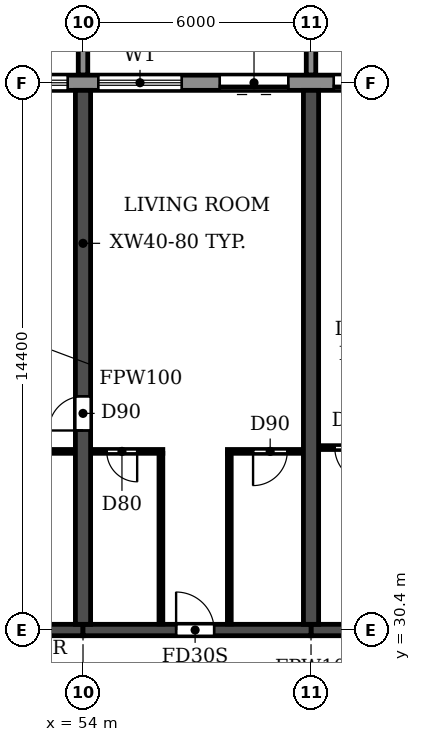
"""IFC4 building model, lengths in metres.
Left out: names, types, materials, properties, quantities, classifications, styles, units other than length and angle.
Written with IfcOpenShell. Run it as: python <this file> out.ifc"""

import sys

from ifc_helpers import new_model, si_unit, direction, frame, frame_2d, origin, place, context, subcontext, project, spatial, polyline, rectangle, outline, extrude, source, transform, mapped, element, fill, save


model = new_model("IFC4")
c1 = context("Model", 3, precision=1e-05, world=origin(), true_north=direction((0.0, 1.0)))
c2 = subcontext(c1, "Body", "Model", "MODEL_VIEW")
j1 = project(units=[si_unit("LENGTHUNIT", "METRE"), si_unit("PLANEANGLEUNIT", "RADIAN")], contexts=[c1])
p1 = place(None, origin())
s1 = spatial("IfcSite", under=j1, at=p1, CompositionType="ELEMENT")
p2 = place(p1, origin())
s2 = spatial("IfcBuilding", under=s1, at=p2, CompositionType="ELEMENT")
p3 = place(p2, frame((0.0, 0.0, 56.4)))
s3 = spatial("IfcBuildingStorey", under=s2, at=p3, CompositionType="ELEMENT", Elevation=56.4)
p4 = place(p3, frame((54.0, 30.55, 0.0), z_axis=(0.0, 0.0, 1.0), x_axis=(0.0, 1.0, 0.0)))
e1 = element("IfcWall", 1, at=p4, inside=s3, PredefinedType="SHEAR", context=c2, shape_type="SweptSolid", body=[
    extrude(rectangle(XDim=14.05, YDim=0.4, at=frame_2d((7.025, 0.0))), origin(), (0.0, 0.0, 1.0), 3.05),
])
p5 = place(p4, frame((5.1, 0.0, 0.0)))
e2 = element("IfcOpeningElement", 2, at=p5, cuts=e1, PredefinedType="OPENING", context=c2, shape_type="SweptSolid", body=[
    extrude(rectangle(XDim=0.9, YDim=2.1, at=frame_2d((0.45, 1.05))), frame((0.0, 0.21, 0.0), z_axis=(0.0, -1.0, 0.0), x_axis=(1.0, 0.0, 0.0)), (0.0, 0.0, 1.0), 0.42),
])
p6 = place(p3, frame((60.0, 30.55, 0.0), z_axis=(0.0, 0.0, 1.0), x_axis=(0.0, 1.0, 0.0)))
e3 = element("IfcWall", 3, at=p6, inside=s3, PredefinedType="SHEAR", context=c2, shape_type="SweptSolid", body=[
    extrude(rectangle(XDim=14.05, YDim=0.4, at=frame_2d((7.025, 0.0))), origin(), (0.0, 0.0, 1.0), 3.05),
])
p7 = place(p3, frame((48.0, 30.4, 0.0), z_axis=(0.0, 0.0, 1.0), x_axis=(1.0, 0.0, 0.0)))
e4 = element("IfcWall", 4, at=p7, inside=s3, PredefinedType="SHEAR", context=c2, shape_type="SweptSolid", body=[
    extrude(rectangle(XDim=6.0, YDim=0.3, at=frame_2d((3.0, 0.0))), origin(), (0.0, 0.0, 1.0), 2.45),
])
p8 = place(p3, frame((54.0, 30.4, 0.0), z_axis=(0.0, 0.0, 1.0), x_axis=(1.0, 0.0, 0.0)))
e5 = element("IfcWall", 5, at=p8, inside=s3, PredefinedType="SHEAR", context=c2, shape_type="SweptSolid", body=[
    extrude(rectangle(XDim=6.0, YDim=0.3, at=frame_2d((3.0, 0.0))), origin(), (0.0, 0.0, 1.0), 2.45),
])
p9 = place(p8, frame((2.45, 0.0, 0.0)))
e6 = element("IfcOpeningElement", 6, at=p9, cuts=e5, PredefinedType="OPENING", context=c2, shape_type="SweptSolid", body=[
    extrude(rectangle(XDim=1.0, YDim=2.1, at=frame_2d((0.5, 1.05))), frame((0.0, 0.16, 0.0), z_axis=(0.0, -1.0, 0.0), x_axis=(1.0, 0.0, 0.0)), (0.0, 0.0, 1.0), 0.32),
])
p10 = place(p3, frame((60.0, 30.4, 0.0), z_axis=(0.0, 0.0, 1.0), x_axis=(1.0, 0.0, 0.0)))
e7 = element("IfcWall", 7, at=p10, inside=s3, PredefinedType="SHEAR", context=c2, shape_type="SweptSolid", body=[
    extrude(rectangle(XDim=6.0, YDim=0.3, at=frame_2d((3.0, 0.0))), origin(), (0.0, 0.0, 1.0), 2.45),
])
p11 = place(p10, frame((2.55, 0.0, 0.0)))
e8 = element("IfcOpeningElement", 8, at=p11, cuts=e7, PredefinedType="OPENING", context=c2, shape_type="SweptSolid", body=[
    extrude(rectangle(XDim=1.0, YDim=2.1, at=frame_2d((0.5, 1.05))), frame((0.0, 0.16, 0.0), z_axis=(0.0, -1.0, 0.0), x_axis=(1.0, 0.0, 0.0)), (0.0, 0.0, 1.0), 0.32),
])
p12 = place(p3, frame((91.317, 44.8, 0.0), z_axis=(0.0, 0.0, 1.0), x_axis=(-1.0, 0.0, 0.0)))
e9 = element("IfcWall", 9, at=p12, inside=s3, PredefinedType="STANDARD", context=c2, shape_type="SweptSolid", body=[
    extrude(rectangle(XDim=80.634, YDim=0.4, at=frame_2d((40.317, 0.0))), origin(), (0.0, 0.0, 1.0), 3.05),
])
p13 = place(p12, frame((76.717, 0.0, 0.9)))
e10 = element("IfcOpeningElement", 10, at=p13, cuts=e9, PredefinedType="OPENING", context=c2, shape_type="SweptSolid", body=[
    extrude(rectangle(XDim=2.2, YDim=1.5, at=frame_2d((1.1, 0.75))), frame((0.0, 0.21, 0.0), z_axis=(0.0, -1.0, 0.0), x_axis=(1.0, 0.0, 0.0)), (0.0, 0.0, 1.0), 0.42),
])
p14 = place(p12, frame((73.917, 0.0, 0.0)))
e11 = element("IfcOpeningElement", 11, at=p14, cuts=e9, PredefinedType="OPENING", context=c2, shape_type="SweptSolid", body=[
    extrude(rectangle(XDim=1.8, YDim=2.4, at=frame_2d((0.9, 1.2))), frame((0.0, 0.21, 0.0), z_axis=(0.0, -1.0, 0.0), x_axis=(1.0, 0.0, 0.0)), (0.0, 0.0, 1.0), 0.42),
])
p15 = place(p12, frame((70.717, 0.0, 0.9)))
e12 = element("IfcOpeningElement", 12, at=p15, cuts=e9, PredefinedType="OPENING", context=c2, shape_type="SweptSolid", body=[
    extrude(rectangle(XDim=2.2, YDim=1.5, at=frame_2d((1.1, 0.75))), frame((0.0, 0.21, 0.0), z_axis=(0.0, -1.0, 0.0), x_axis=(1.0, 0.0, 0.0)), (0.0, 0.0, 1.0), 0.42),
])
p16 = place(p12, frame((67.917, 0.0, 0.0)))
e13 = element("IfcOpeningElement", 13, at=p16, cuts=e9, PredefinedType="OPENING", context=c2, shape_type="SweptSolid", body=[
    extrude(rectangle(XDim=1.8, YDim=2.4, at=frame_2d((0.9, 1.2))), frame((0.0, 0.21, 0.0), z_axis=(0.0, -1.0, 0.0), x_axis=(1.0, 0.0, 0.0)), (0.0, 0.0, 1.0), 0.42),
])
p17 = place(p12, frame((64.717, 0.0, 0.9)))
e14 = element("IfcOpeningElement", 14, at=p17, cuts=e9, PredefinedType="OPENING", context=c2, shape_type="SweptSolid", body=[
    extrude(rectangle(XDim=2.2, YDim=1.5, at=frame_2d((1.1, 0.75))), frame((0.0, 0.21, 0.0), z_axis=(0.0, -1.0, 0.0), x_axis=(1.0, 0.0, 0.0)), (0.0, 0.0, 1.0), 0.42),
])
p18 = place(p12, frame((61.917, 0.0, 0.0)))
e15 = element("IfcOpeningElement", 15, at=p18, cuts=e9, PredefinedType="OPENING", context=c2, shape_type="SweptSolid", body=[
    extrude(rectangle(XDim=1.8, YDim=2.4, at=frame_2d((0.9, 1.2))), frame((0.0, 0.21, 0.0), z_axis=(0.0, -1.0, 0.0), x_axis=(1.0, 0.0, 0.0)), (0.0, 0.0, 1.0), 0.42),
])
p19 = place(p12, frame((58.717, 0.0, 0.9)))
e16 = element("IfcOpeningElement", 16, at=p19, cuts=e9, PredefinedType="OPENING", context=c2, shape_type="SweptSolid", body=[
    extrude(rectangle(XDim=2.2, YDim=1.5, at=frame_2d((1.1, 0.75))), frame((0.0, 0.21, 0.0), z_axis=(0.0, -1.0, 0.0), x_axis=(1.0, 0.0, 0.0)), (0.0, 0.0, 1.0), 0.42),
])
p20 = place(p12, frame((55.717, 0.0, 0.9)))
e17 = element("IfcOpeningElement", 17, at=p20, cuts=e9, PredefinedType="OPENING", context=c2, shape_type="SweptSolid", body=[
    extrude(rectangle(XDim=2.2, YDim=1.5, at=frame_2d((1.1, 0.75))), frame((0.0, 0.21, 0.0), z_axis=(0.0, -1.0, 0.0), x_axis=(1.0, 0.0, 0.0)), (0.0, 0.0, 1.0), 0.42),
])
p21 = place(p12, frame((52.917, 0.0, 0.0)))
e18 = element("IfcOpeningElement", 18, at=p21, cuts=e9, PredefinedType="OPENING", context=c2, shape_type="SweptSolid", body=[
    extrude(rectangle(XDim=1.8, YDim=2.4, at=frame_2d((0.9, 1.2))), frame((0.0, 0.21, 0.0), z_axis=(0.0, -1.0, 0.0), x_axis=(1.0, 0.0, 0.0)), (0.0, 0.0, 1.0), 0.42),
])
p22 = place(p12, frame((49.717, 0.0, 0.9)))
e19 = element("IfcOpeningElement", 19, at=p22, cuts=e9, PredefinedType="OPENING", context=c2, shape_type="SweptSolid", body=[
    extrude(rectangle(XDim=2.2, YDim=1.5, at=frame_2d((1.1, 0.75))), frame((0.0, 0.21, 0.0), z_axis=(0.0, -1.0, 0.0), x_axis=(1.0, 0.0, 0.0)), (0.0, 0.0, 1.0), 0.42),
])
p23 = place(p12, frame((46.917, 0.0, 0.0)))
e20 = element("IfcOpeningElement", 20, at=p23, cuts=e9, PredefinedType="OPENING", context=c2, shape_type="SweptSolid", body=[
    extrude(rectangle(XDim=1.8, YDim=2.4, at=frame_2d((0.9, 1.2))), frame((0.0, 0.21, 0.0), z_axis=(0.0, -1.0, 0.0), x_axis=(1.0, 0.0, 0.0)), (0.0, 0.0, 1.0), 0.42),
])
p24 = place(p12, frame((43.717, 0.0, 0.9)))
e21 = element("IfcOpeningElement", 21, at=p24, cuts=e9, PredefinedType="OPENING", context=c2, shape_type="SweptSolid", body=[
    extrude(rectangle(XDim=2.2, YDim=1.5, at=frame_2d((1.1, 0.75))), frame((0.0, 0.21, 0.0), z_axis=(0.0, -1.0, 0.0), x_axis=(1.0, 0.0, 0.0)), (0.0, 0.0, 1.0), 0.42),
])
p25 = place(p12, frame((40.717, 0.0, 0.9)))
e22 = element("IfcOpeningElement", 22, at=p25, cuts=e9, PredefinedType="OPENING", context=c2, shape_type="SweptSolid", body=[
    extrude(rectangle(XDim=2.2, YDim=1.5, at=frame_2d((1.1, 0.75))), frame((0.0, 0.21, 0.0), z_axis=(0.0, -1.0, 0.0), x_axis=(1.0, 0.0, 0.0)), (0.0, 0.0, 1.0), 0.42),
])
p26 = place(p12, frame((37.717, 0.0, 0.9)))
e23 = element("IfcOpeningElement", 23, at=p26, cuts=e9, PredefinedType="OPENING", context=c2, shape_type="SweptSolid", body=[
    extrude(rectangle(XDim=2.2, YDim=1.5, at=frame_2d((1.1, 0.75))), frame((0.0, 0.21, 0.0), z_axis=(0.0, -1.0, 0.0), x_axis=(1.0, 0.0, 0.0)), (0.0, 0.0, 1.0), 0.42),
])
p27 = place(p12, frame((34.717, 0.0, 0.9)))
e24 = element("IfcOpeningElement", 24, at=p27, cuts=e9, PredefinedType="OPENING", context=c2, shape_type="SweptSolid", body=[
    extrude(rectangle(XDim=2.2, YDim=1.5, at=frame_2d((1.1, 0.75))), frame((0.0, 0.21, 0.0), z_axis=(0.0, -1.0, 0.0), x_axis=(1.0, 0.0, 0.0)), (0.0, 0.0, 1.0), 0.42),
])
p28 = place(p12, frame((31.917, 0.0, 0.0)))
e25 = element("IfcOpeningElement", 25, at=p28, cuts=e9, PredefinedType="OPENING", context=c2, shape_type="SweptSolid", body=[
    extrude(rectangle(XDim=1.8, YDim=2.4, at=frame_2d((0.9, 1.2))), frame((0.0, 0.21, 0.0), z_axis=(0.0, -1.0, 0.0), x_axis=(1.0, 0.0, 0.0)), (0.0, 0.0, 1.0), 0.42),
])
p29 = place(p12, frame((28.917, 0.0, 0.0)))
e26 = element("IfcOpeningElement", 26, at=p29, cuts=e9, PredefinedType="OPENING", context=c2, shape_type="SweptSolid", body=[
    extrude(rectangle(XDim=1.8, YDim=2.4, at=frame_2d((0.9, 1.2))), frame((0.0, 0.21, 0.0), z_axis=(0.0, -1.0, 0.0), x_axis=(1.0, 0.0, 0.0)), (0.0, 0.0, 1.0), 0.42),
])
p30 = place(p12, frame((25.717, 0.0, 0.9)))
e27 = element("IfcOpeningElement", 27, at=p30, cuts=e9, PredefinedType="OPENING", context=c2, shape_type="SweptSolid", body=[
    extrude(rectangle(XDim=2.2, YDim=1.5, at=frame_2d((1.1, 0.75))), frame((0.0, 0.21, 0.0), z_axis=(0.0, -1.0, 0.0), x_axis=(1.0, 0.0, 0.0)), (0.0, 0.0, 1.0), 0.42),
])
p31 = place(p12, frame((22.917, 0.0, 0.0)))
e28 = element("IfcOpeningElement", 28, at=p31, cuts=e9, PredefinedType="OPENING", context=c2, shape_type="SweptSolid", body=[
    extrude(rectangle(XDim=1.8, YDim=2.4, at=frame_2d((0.9, 1.2))), frame((0.0, 0.21, 0.0), z_axis=(0.0, -1.0, 0.0), x_axis=(1.0, 0.0, 0.0)), (0.0, 0.0, 1.0), 0.42),
])
p32 = place(p12, frame((19.717, 0.0, 0.9)))
e29 = element("IfcOpeningElement", 29, at=p32, cuts=e9, PredefinedType="OPENING", context=c2, shape_type="SweptSolid", body=[
    extrude(rectangle(XDim=2.2, YDim=1.5, at=frame_2d((1.1, 0.75))), frame((0.0, 0.21, 0.0), z_axis=(0.0, -1.0, 0.0), x_axis=(1.0, 0.0, 0.0)), (0.0, 0.0, 1.0), 0.42),
])
p33 = place(p12, frame((16.917, 0.0, 0.0)))
e30 = element("IfcOpeningElement", 30, at=p33, cuts=e9, PredefinedType="OPENING", context=c2, shape_type="SweptSolid", body=[
    extrude(rectangle(XDim=1.8, YDim=2.4, at=frame_2d((0.9, 1.2))), frame((0.0, 0.21, 0.0), z_axis=(0.0, -1.0, 0.0), x_axis=(1.0, 0.0, 0.0)), (0.0, 0.0, 1.0), 0.42),
])
p34 = place(p12, frame((13.717, 0.0, 0.9)))
e31 = element("IfcOpeningElement", 31, at=p34, cuts=e9, PredefinedType="OPENING", context=c2, shape_type="SweptSolid", body=[
    extrude(rectangle(XDim=2.2, YDim=1.5, at=frame_2d((1.1, 0.75))), frame((0.0, 0.21, 0.0), z_axis=(0.0, -1.0, 0.0), x_axis=(1.0, 0.0, 0.0)), (0.0, 0.0, 1.0), 0.42),
])
p35 = place(p12, frame((10.917, 0.0, 0.0)))
e32 = element("IfcOpeningElement", 32, at=p35, cuts=e9, PredefinedType="OPENING", context=c2, shape_type="SweptSolid", body=[
    extrude(rectangle(XDim=1.8, YDim=2.4, at=frame_2d((0.9, 1.2))), frame((0.0, 0.21, 0.0), z_axis=(0.0, -1.0, 0.0), x_axis=(1.0, 0.0, 0.0)), (0.0, 0.0, 1.0), 0.42),
])
p36 = place(p12, frame((7.717, 0.0, 0.9)))
e33 = element("IfcOpeningElement", 33, at=p36, cuts=e9, PredefinedType="OPENING", context=c2, shape_type="SweptSolid", body=[
    extrude(rectangle(XDim=2.2, YDim=1.5, at=frame_2d((1.1, 0.75))), frame((0.0, 0.21, 0.0), z_axis=(0.0, -1.0, 0.0), x_axis=(1.0, 0.0, 0.0)), (0.0, 0.0, 1.0), 0.42),
])
p37 = place(p12, frame((4.717, 0.0, 0.9)))
e34 = element("IfcOpeningElement", 34, at=p37, cuts=e9, PredefinedType="OPENING", context=c2, shape_type="SweptSolid", body=[
    extrude(rectangle(XDim=2.2, YDim=1.5, at=frame_2d((1.1, 0.75))), frame((0.0, 0.21, 0.0), z_axis=(0.0, -1.0, 0.0), x_axis=(1.0, 0.0, 0.0)), (0.0, 0.0, 1.0), 0.42),
])
p38 = place(p12, frame((1.717, 0.0, 0.9)))
e35 = element("IfcOpeningElement", 35, at=p38, cuts=e9, PredefinedType="OPENING", context=c2, shape_type="SweptSolid", body=[
    extrude(rectangle(XDim=2.2, YDim=1.5, at=frame_2d((1.1, 0.75))), frame((0.0, 0.21, 0.0), z_axis=(0.0, -1.0, 0.0), x_axis=(1.0, 0.0, 0.0)), (0.0, 0.0, 1.0), 0.42),
])
m1 = source(origin(), c2, "Body", "SweptSolid", [
    extrude(outline(polyline([(0.0, 0.0), (0.25, 0.0), (0.25, 3.1), (0.0, 3.1), (0.0, 0.0)])), origin(), (0.0, 0.0, 1.0), 3.1),
])
for number, where in (
    (36, (53.875, 45.0, 0.0)),
    (37, (59.875, 45.0, 0.0)),
):
    element("IfcWall", number, at=place(p3, frame(where)), inside=s3, PredefinedType="STANDARD", context=c2, shape_type="MappedRepresentation", body=[
        mapped(m1, transform((0.0, 0.0, 0.0))),
    ])
p39 = place(p3, frame((51.1, 35.1, 0.0), z_axis=(0.0, 0.0, 1.0), x_axis=(1.0, 0.0, 0.0)))
e38 = element("IfcWall", 38, at=p39, inside=s3, PredefinedType="PARTITIONING", context=c2, shape_type="SweptSolid", body=[
    extrude(rectangle(XDim=2.69, YDim=0.1, at=frame_2d((1.345, 0.0))), origin(), (0.0, 0.0, 1.0), 3.05),
])
p40 = place(p39, frame((1.0, 0.0, 0.0)))
e39 = element("IfcOpeningElement", 39, at=p40, cuts=e38, PredefinedType="OPENING", context=c2, shape_type="SweptSolid", body=[
    extrude(rectangle(XDim=0.8, YDim=2.1, at=frame_2d((0.4, 1.05))), frame((0.0, 0.06, 0.0), z_axis=(0.0, -1.0, 0.0), x_axis=(1.0, 0.0, 0.0)), (0.0, 0.0, 1.0), 0.12),
])
p41 = place(p3, frame((54.21, 35.1, 0.0), z_axis=(0.0, 0.0, 1.0), x_axis=(1.0, 0.0, 0.0)))
e40 = element("IfcWall", 40, at=p41, inside=s3, PredefinedType="PARTITIONING", context=c2, shape_type="SweptSolid", body=[
    extrude(rectangle(XDim=1.89, YDim=0.1, at=frame_2d((0.945, 0.0))), origin(), (0.0, 0.0, 1.0), 3.05),
])
p42 = place(p41, frame((0.415, 0.0, 0.0)))
e41 = element("IfcOpeningElement", 41, at=p42, cuts=e40, PredefinedType="OPENING", context=c2, shape_type="SweptSolid", body=[
    extrude(rectangle(XDim=0.8, YDim=2.1, at=frame_2d((0.4, 1.05))), frame((0.0, 0.06, 0.0), z_axis=(0.0, -1.0, 0.0), x_axis=(1.0, 0.0, 0.0)), (0.0, 0.0, 1.0), 0.12),
])
p43 = place(p3, frame((57.8, 35.1, 0.0), z_axis=(0.0, 0.0, 1.0), x_axis=(1.0, 0.0, 0.0)))
e42 = element("IfcWall", 42, at=p43, inside=s3, PredefinedType="PARTITIONING", context=c2, shape_type="SweptSolid", body=[
    extrude(rectangle(XDim=1.99, YDim=0.1, at=frame_2d((0.995, 0.0))), origin(), (0.0, 0.0, 1.0), 3.05),
])
p44 = place(p43, frame((0.675, 0.0, 0.0)))
e43 = element("IfcOpeningElement", 43, at=p44, cuts=e42, PredefinedType="OPENING", context=c2, shape_type="SweptSolid", body=[
    extrude(rectangle(XDim=0.9, YDim=2.1, at=frame_2d((0.45, 1.05))), frame((0.0, 0.06, 0.0), z_axis=(0.0, -1.0, 0.0), x_axis=(1.0, 0.0, 0.0)), (0.0, 0.0, 1.0), 0.12),
])
p45 = place(p3, frame((60.21, 35.2, 0.0), z_axis=(0.0, 0.0, 1.0), x_axis=(1.0, 0.0, 0.0)))
e44 = element("IfcWall", 44, at=p45, inside=s3, PredefinedType="PARTITIONING", context=c2, shape_type="SweptSolid", body=[
    extrude(rectangle(XDim=1.99, YDim=0.1, at=frame_2d((0.995, 0.0))), origin(), (0.0, 0.0, 1.0), 3.05),
])
p46 = place(p45, frame((0.415, 0.0, 0.0)))
e45 = element("IfcOpeningElement", 45, at=p46, cuts=e44, PredefinedType="OPENING", context=c2, shape_type="SweptSolid", body=[
    extrude(rectangle(XDim=0.9, YDim=2.1, at=frame_2d((0.45, 1.05))), frame((0.0, 0.06, 0.0), z_axis=(0.0, -1.0, 0.0), x_axis=(1.0, 0.0, 0.0)), (0.0, 0.0, 1.0), 0.12),
])
for number, where, z_axis, x_axis in (
    (46, (56.05, 30.56, 0.0), (0.0, 0.0, 1.0), (0.0, 1.0, 0.0)),
    (47, (57.85, 30.56, 0.0), (0.0, 0.0, 1.0), (0.0, 1.0, 0.0)),
):
    element("IfcWall", number, at=place(p3, frame(where, z_axis=z_axis, x_axis=x_axis)), inside=s3, PredefinedType="PARTITIONING", context=c2, shape_type="SweptSolid", body=[
        extrude(rectangle(XDim=4.49, YDim=0.1, at=frame_2d((2.245, 0.0))), origin(), (0.0, 0.0, 1.0), 3.05),
    ])
p47 = place(p26, origin())
e48 = element("IfcWindow", 48, at=p47, inside=s3, PartitioningType="DOUBLE_PANEL_HORIZONTAL", PredefinedType="WINDOW", context=c2, shape_type="SweptSolid", body=[
    extrude(rectangle(XDim=2.2, YDim=1.5, at=frame_2d((1.1, 0.75))), frame((0.0, 0.03, 0.0), z_axis=(0.0, -1.0, 0.0), x_axis=(1.0, 0.0, 0.0)), (0.0, 0.0, 1.0), 0.06),
])
fill(e23, e48)
p48 = place(p27, origin())
e49 = element("IfcWindow", 49, at=p48, inside=s3, PartitioningType="DOUBLE_PANEL_HORIZONTAL", PredefinedType="WINDOW", context=c2, shape_type="SweptSolid", body=[
    extrude(rectangle(XDim=2.2, YDim=1.5, at=frame_2d((1.1, 0.75))), frame((0.0, 0.03, 0.0), z_axis=(0.0, -1.0, 0.0), x_axis=(1.0, 0.0, 0.0)), (0.0, 0.0, 1.0), 0.06),
])
fill(e24, e49)
p49 = place(p28, origin())
e50 = element("IfcDoor", 50, at=p49, inside=s3, OperationType="DOUBLE_DOOR_SLIDING", PredefinedType="DOOR", context=c2, shape_type="SweptSolid", body=[
    extrude(rectangle(XDim=1.8, YDim=2.4, at=frame_2d((0.9, 1.2))), frame((0.0, 0.025, 0.0), z_axis=(0.0, -1.0, 0.0), x_axis=(1.0, 0.0, 0.0)), (0.0, 0.0, 1.0), 0.05),
])
fill(e25, e50)
p50 = place(p29, origin())
e51 = element("IfcDoor", 51, at=p50, inside=s3, OperationType="DOUBLE_DOOR_SLIDING", PredefinedType="DOOR", context=c2, shape_type="SweptSolid", body=[
    extrude(rectangle(XDim=1.8, YDim=2.4, at=frame_2d((0.9, 1.2))), frame((0.0, 0.025, 0.0), z_axis=(0.0, -1.0, 0.0), x_axis=(1.0, 0.0, 0.0)), (0.0, 0.0, 1.0), 0.05),
])
fill(e26, e51)
p51 = place(p5, origin())
e52 = element("IfcDoor", 52, at=p51, inside=s3, OperationType="SINGLE_SWING_LEFT", PredefinedType="DOOR", context=c2, shape_type="SweptSolid", body=[
    extrude(rectangle(XDim=0.9, YDim=2.1, at=frame_2d((0.45, 1.05))), frame((0.0, 0.025, 0.0), z_axis=(0.0, -1.0, 0.0), x_axis=(1.0, 0.0, 0.0)), (0.0, 0.0, 1.0), 0.05),
])
fill(e2, e52)
p52 = place(p42, frame((0.8, 0.0, 0.0), z_axis=(0.0, 0.0, 1.0), x_axis=(-1.0, 0.0, 0.0)))
e53 = element("IfcDoor", 53, at=p52, inside=s3, OperationType="SINGLE_SWING_LEFT", PredefinedType="DOOR", context=c2, shape_type="SweptSolid", body=[
    extrude(rectangle(XDim=0.8, YDim=2.1, at=frame_2d((0.4, 1.05))), frame((0.0, 0.025, 0.0), z_axis=(0.0, -1.0, 0.0), x_axis=(1.0, 0.0, 0.0)), (0.0, 0.0, 1.0), 0.05),
])
fill(e41, e53)
p53 = place(p9, origin())
e54 = element("IfcDoor", 54, at=p53, inside=s3, OperationType="SINGLE_SWING_LEFT", PredefinedType="DOOR", context=c2, shape_type="SweptSolid", body=[
    extrude(rectangle(XDim=1.0, YDim=2.1, at=frame_2d((0.5, 1.05))), frame((0.0, 0.025, 0.0), z_axis=(0.0, -1.0, 0.0), x_axis=(1.0, 0.0, 0.0)), (0.0, 0.0, 1.0), 0.05),
])
fill(e6, e54)
p54 = place(p44, frame((0.9, 0.0, 0.0), z_axis=(0.0, 0.0, 1.0), x_axis=(-1.0, 0.0, 0.0)))
e55 = element("IfcDoor", 55, at=p54, inside=s3, OperationType="SINGLE_SWING_RIGHT", PredefinedType="DOOR", context=c2, shape_type="SweptSolid", body=[
    extrude(rectangle(XDim=0.9, YDim=2.1, at=frame_2d((0.45, 1.05))), frame((0.0, 0.025, 0.0), z_axis=(0.0, -1.0, 0.0), x_axis=(1.0, 0.0, 0.0)), (0.0, 0.0, 1.0), 0.05),
])
fill(e43, e55)
p55 = place(p46, frame((0.9, 0.0, 0.0), z_axis=(0.0, 0.0, 1.0), x_axis=(-1.0, 0.0, 0.0)))
e56 = element("IfcDoor", 56, at=p55, inside=s3, OperationType="SINGLE_SWING_LEFT", PredefinedType="DOOR", context=c2, shape_type="SweptSolid", body=[
    extrude(rectangle(XDim=0.9, YDim=2.1, at=frame_2d((0.45, 1.05))), frame((0.0, 0.025, 0.0), z_axis=(0.0, -1.0, 0.0), x_axis=(1.0, 0.0, 0.0)), (0.0, 0.0, 1.0), 0.05),
])
fill(e45, e56)
save(model, sys.argv[1])
